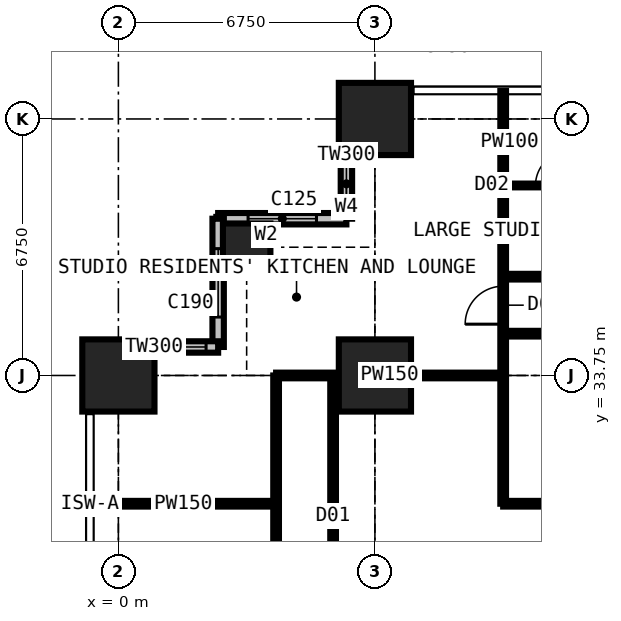
"""IFC4 building model, lengths in metres.
Left out: names, types, materials, properties, quantities, classifications, styles, units other than length and angle.
Written with IfcOpenShell. Run it as: python <this file> out.ifc"""

import sys

from ifc_helpers import new_model, si_unit, direction, frame, frame_2d, origin, origin_2d, place, context, subcontext, project, spatial, rectangle, extrude, element, fill, save


model = new_model("IFC4")
c1 = context("Model", 3, precision=1e-05, world=origin(), true_north=direction((0.0, 1.0)))
c2 = subcontext(c1, "Body", "Model", "MODEL_VIEW")
j1 = project(units=[si_unit("LENGTHUNIT", "METRE"), si_unit("PLANEANGLEUNIT", "RADIAN")], contexts=[c1])
p1 = place(None, origin())
s1 = spatial("IfcSite", under=j1, at=p1, CompositionType="ELEMENT")
p2 = place(p1, origin())
s2 = spatial("IfcBuilding", under=s1, at=p2, CompositionType="ELEMENT")
p3 = place(p2, frame((0.0, 0.0, 28.8)))
s3 = spatial("IfcBuildingStorey", under=s2, at=p3, CompositionType="ELEMENT", Elevation=28.8)
p4 = place(p3, frame((0.0, 33.75, 0.0), z_axis=(0.0, 0.0, 1.0), x_axis=(1.0, 0.0, 0.0)))
e1 = element("IfcColumn", 1, at=p4, inside=s3, PredefinedType="COLUMN", context=c2, shape_type="SweptSolid", body=[
    extrude(rectangle(XDim=1.9, YDim=1.9, at=origin_2d()), origin(), (0.0, 0.0, 1.0), 3.6),
])
p5 = place(p3, frame((3.375, 37.125, 0.0), z_axis=(0.0, 0.0, 1.0), x_axis=(1.0, 0.0, 0.0)))
e2 = element("IfcColumn", 2, at=p5, inside=s3, PredefinedType="COLUMN", context=c2, shape_type="SweptSolid", body=[
    extrude(rectangle(XDim=1.25, YDim=1.25, at=origin_2d()), origin(), (0.0, 0.0, 1.0), 3.6),
])
for number, where, z_axis, x_axis in (
    (3, (6.75, 33.75, 0.0), (0.0, 0.0, 1.0), (1.0, 0.0, 0.0)),
    (4, (6.75, 40.5, 0.0), (0.0, 0.0, 1.0), (1.0, 0.0, 0.0)),
):
    element("IfcColumn", number, at=place(p3, frame(where, z_axis=z_axis, x_axis=x_axis)), inside=s3, PredefinedType="COLUMN", context=c2, shape_type="SweptSolid", body=[
        extrude(rectangle(XDim=1.9, YDim=1.9, at=origin_2d()), origin(), (0.0, 0.0, 1.0), 3.6),
    ])
p6 = place(p3, frame((6.0, 41.25, 0.0), z_axis=(0.0, 0.0, 1.0), x_axis=(0.0, -1.0, 0.0)))
e5 = element("IfcWall", 5, at=p6, inside=s3, PredefinedType="SOLIDWALL", context=c2, shape_type="SweptSolid", body=[
    extrude(rectangle(XDim=3.375, YDim=0.3, at=frame_2d((1.688, 0.0))), origin(), (0.0, 0.0, 1.0), 3.375),
])
p7 = place(p6, frame((1.857, 0.0, 0.9)))
e6 = element("IfcOpeningElement", 6, at=p7, cuts=e5, PredefinedType="OPENING", context=c2, shape_type="SweptSolid", body=[
    extrude(rectangle(XDim=1.2, YDim=1.8, at=frame_2d((0.6, 0.9))), frame((0.0, 0.16, 0.0), z_axis=(0.0, -1.0, 0.0), x_axis=(1.0, 0.0, 0.0)), (0.0, 0.0, 1.0), 0.32),
])
p8 = place(p3, frame((6.0, 37.875, 0.0), z_axis=(0.0, 0.0, 1.0), x_axis=(-1.0, 0.0, 0.0)))
e7 = element("IfcWall", 7, at=p8, inside=s3, PredefinedType="SOLIDWALL", context=c2, shape_type="SweptSolid", body=[
    extrude(rectangle(XDim=3.375, YDim=0.3, at=frame_2d((1.688, 0.0))), origin(), (0.0, 0.0, 1.0), 3.375),
])
p9 = place(p8, frame((0.788, 0.0, 0.6)))
e8 = element("IfcOpeningElement", 8, at=p9, cuts=e7, PredefinedType="OPENING", context=c2, shape_type="SweptSolid", body=[
    extrude(rectangle(XDim=1.8, YDim=2.1, at=frame_2d((0.9, 1.05))), frame((0.0, 0.16, 0.0), z_axis=(0.0, -1.0, 0.0), x_axis=(1.0, 0.0, 0.0)), (0.0, 0.0, 1.0), 0.32),
])
p10 = place(p3, frame((2.625, 37.875, 0.0), z_axis=(0.0, 0.0, 1.0), x_axis=(0.0, -1.0, 0.0)))
e9 = element("IfcWall", 9, at=p10, inside=s3, PredefinedType="SOLIDWALL", context=c2, shape_type="SweptSolid", body=[
    extrude(rectangle(XDim=3.375, YDim=0.3, at=frame_2d((1.688, 0.0))), origin(), (0.0, 0.0, 1.0), 3.375),
])
p11 = place(p10, frame((0.788, 0.0, 0.6)))
e10 = element("IfcOpeningElement", 10, at=p11, cuts=e9, PredefinedType="OPENING", context=c2, shape_type="SweptSolid", body=[
    extrude(rectangle(XDim=1.8, YDim=2.1, at=frame_2d((0.9, 1.05))), frame((0.0, 0.16, 0.0), z_axis=(0.0, -1.0, 0.0), x_axis=(1.0, 0.0, 0.0)), (0.0, 0.0, 1.0), 0.32),
])
p12 = place(p3, frame((2.625, 34.5, 0.0), z_axis=(0.0, 0.0, 1.0), x_axis=(-1.0, 0.0, 0.0)))
e11 = element("IfcWall", 11, at=p12, inside=s3, PredefinedType="SOLIDWALL", context=c2, shape_type="SweptSolid", body=[
    extrude(rectangle(XDim=3.375, YDim=0.3, at=frame_2d((1.688, 0.0))), origin(), (0.0, 0.0, 1.0), 3.375),
])
p13 = place(p12, frame((0.317, 0.0, 0.9)))
e12 = element("IfcOpeningElement", 12, at=p13, cuts=e11, PredefinedType="OPENING", context=c2, shape_type="SweptSolid", body=[
    extrude(rectangle(XDim=1.2, YDim=1.8, at=frame_2d((0.6, 0.9))), frame((0.0, 0.16, 0.0), z_axis=(0.0, -1.0, 0.0), x_axis=(1.0, 0.0, 0.0)), (0.0, 0.0, 1.0), 0.32),
])
p14 = place(p3, frame((-0.734, 30.375, 0.0), z_axis=(0.0, 0.0, 1.0), x_axis=(1.0, 0.0, 0.0)))
e13 = element("IfcWall", 13, at=p14, inside=s3, PredefinedType="PARTITIONING", context=c2, shape_type="SweptSolid", body=[
    extrude(rectangle(XDim=4.884, YDim=0.15, at=frame_2d((2.442, 0.0))), origin(), (0.0, 0.0, 1.0), 3.375),
])
p15 = place(p3, frame((4.15, 10.125, 0.0), z_axis=(0.0, 0.0, 1.0), x_axis=(0.0, 1.0, 0.0)))
e14 = element("IfcWall", 14, at=p15, inside=s3, PredefinedType="PARTITIONING", context=c2, shape_type="SweptSolid", body=[
    extrude(rectangle(XDim=23.625, YDim=0.15, at=frame_2d((11.812, 0.0))), origin(), (0.0, 0.0, 1.0), 3.375),
])
p16 = place(p15, frame((4.2, 0.0, 0.0)))
e15 = element("IfcOpeningElement", 15, at=p16, cuts=e14, PredefinedType="OPENING", context=c2, shape_type="SweptSolid", body=[
    extrude(rectangle(XDim=0.95, YDim=2.2, at=frame_2d((0.475, 1.1))), frame((0.0, 0.085, 0.0), z_axis=(0.0, -1.0, 0.0), x_axis=(1.0, 0.0, 0.0)), (0.0, 0.0, 1.0), 0.17),
])
p17 = place(p15, frame((10.95, 0.0, 0.0)))
e16 = element("IfcOpeningElement", 16, at=p17, cuts=e14, PredefinedType="OPENING", context=c2, shape_type="SweptSolid", body=[
    extrude(rectangle(XDim=0.95, YDim=2.2, at=frame_2d((0.475, 1.1))), frame((0.0, 0.085, 0.0), z_axis=(0.0, -1.0, 0.0), x_axis=(1.0, 0.0, 0.0)), (0.0, 0.0, 1.0), 0.17),
])
p18 = place(p15, frame((17.7, 0.0, 0.0)))
e17 = element("IfcOpeningElement", 17, at=p18, cuts=e14, PredefinedType="OPENING", context=c2, shape_type="SweptSolid", body=[
    extrude(rectangle(XDim=0.95, YDim=2.2, at=frame_2d((0.475, 1.1))), frame((0.0, 0.085, 0.0), z_axis=(0.0, -1.0, 0.0), x_axis=(1.0, 0.0, 0.0)), (0.0, 0.0, 1.0), 0.17),
])
p19 = place(p3, frame((4.15, 33.75, 0.0), z_axis=(0.0, 0.0, 1.0), x_axis=(1.0, 0.0, 0.0)))
e18 = element("IfcWall", 18, at=p19, inside=s3, PredefinedType="PARTITIONING", context=c2, shape_type="SweptSolid", body=[
    extrude(rectangle(XDim=5.975, YDim=0.15, at=frame_2d((2.988, 0.0))), origin(), (0.0, 0.0, 1.0), 2.877),
])
p20 = place(p3, frame((5.65, 22.988, 0.0), z_axis=(0.0, 0.0, 1.0), x_axis=(0.0, 1.0, 0.0)))
e19 = element("IfcWall", 19, at=p20, inside=s3, PredefinedType="PARTITIONING", context=c2, shape_type="SweptSolid", body=[
    extrude(rectangle(XDim=10.762, YDim=0.15, at=frame_2d((5.381, 0.0))), origin(), (0.0, 0.0, 1.0), 3.375),
])
p21 = place(p20, frame((5.0, 0.0, 0.0)))
e20 = element("IfcOpeningElement", 20, at=p21, cuts=e19, PredefinedType="OPENING", context=c2, shape_type="SweptSolid", body=[
    extrude(rectangle(XDim=0.95, YDim=2.2, at=frame_2d((0.475, 1.1))), frame((0.0, 0.085, 0.0), z_axis=(0.0, -1.0, 0.0), x_axis=(1.0, 0.0, 0.0)), (0.0, 0.0, 1.0), 0.17),
])
p22 = place(p3, frame((10.125, 30.375, 0.0), z_axis=(0.0, 0.0, 1.0), x_axis=(0.0, 1.0, 0.0)))
e21 = element("IfcWall", 21, at=p22, inside=s3, PredefinedType="PARTITIONING", context=c2, shape_type="SweptSolid", body=[
    extrude(rectangle(XDim=10.859, YDim=0.15, at=frame_2d((5.429, 0.0))), origin(), (0.0, 0.0, 1.0), 3.375),
])
p23 = place(p22, frame((4.725, 0.0, 0.0)))
e22 = element("IfcOpeningElement", 22, at=p23, cuts=e21, PredefinedType="OPENING", context=c2, shape_type="SweptSolid", body=[
    extrude(rectangle(XDim=1.0, YDim=2.2, at=frame_2d((0.5, 1.1))), frame((0.0, 0.085, 0.0), z_axis=(0.0, -1.0, 0.0), x_axis=(1.0, 0.0, 0.0)), (0.0, 0.0, 1.0), 0.17),
])
p24 = place(p3, frame((10.125, 30.375, 0.0), z_axis=(0.0, 0.0, 1.0), x_axis=(1.0, 0.0, 0.0)))
e23 = element("IfcWall", 23, at=p24, inside=s3, PredefinedType="PARTITIONING", context=c2, shape_type="SweptSolid", body=[
    extrude(rectangle(XDim=1.175, YDim=0.15, at=frame_2d((0.587, 0.0))), origin(), (0.0, 0.0, 1.0), 3.375),
])
p25 = place(p3, frame((10.125, 34.85, 0.0), z_axis=(0.0, 0.0, 1.0), x_axis=(1.0, 0.0, 0.0)))
e24 = element("IfcWall", 24, at=p25, inside=s3, PredefinedType="PARTITIONING", context=c2, shape_type="SweptSolid", body=[
    extrude(rectangle(XDim=10.762, YDim=0.15, at=frame_2d((5.381, 0.0))), origin(), (0.0, 0.0, 1.0), 3.375),
])
p26 = place(p25, frame((4.9, 0.0, 0.0)))
e25 = element("IfcOpeningElement", 25, at=p26, cuts=e24, PredefinedType="OPENING", context=c2, shape_type="SweptSolid", body=[
    extrude(rectangle(XDim=0.95, YDim=2.2, at=frame_2d((0.475, 1.1))), frame((0.0, 0.085, 0.0), z_axis=(0.0, -1.0, 0.0), x_axis=(1.0, 0.0, 0.0)), (0.0, 0.0, 1.0), 0.17),
])
p27 = place(p3, frame((10.125, 36.35, 0.0), z_axis=(0.0, 0.0, 1.0), x_axis=(1.0, 0.0, 0.0)))
e26 = element("IfcWall", 26, at=p27, inside=s3, PredefinedType="PARTITIONING", context=c2, shape_type="SweptSolid", body=[
    extrude(rectangle(XDim=23.625, YDim=0.15, at=frame_2d((11.812, 0.0))), origin(), (0.0, 0.0, 1.0), 3.375),
])
p28 = place(p27, frame((20.5, 0.0, 0.0)))
e27 = element("IfcOpeningElement", 27, at=p28, cuts=e26, PredefinedType="OPENING", context=c2, shape_type="SweptSolid", body=[
    extrude(rectangle(XDim=0.95, YDim=2.2, at=frame_2d((0.475, 1.1))), frame((0.0, 0.085, 0.0), z_axis=(0.0, -1.0, 0.0), x_axis=(1.0, 0.0, 0.0)), (0.0, 0.0, 1.0), 0.17),
])
p29 = place(p27, frame((17.125, 0.0, 0.0)))
e28 = element("IfcOpeningElement", 28, at=p29, cuts=e26, PredefinedType="OPENING", context=c2, shape_type="SweptSolid", body=[
    extrude(rectangle(XDim=0.95, YDim=2.2, at=frame_2d((0.475, 1.1))), frame((0.0, 0.085, 0.0), z_axis=(0.0, -1.0, 0.0), x_axis=(1.0, 0.0, 0.0)), (0.0, 0.0, 1.0), 0.17),
])
p30 = place(p27, frame((13.7, 0.0, 0.0)))
e29 = element("IfcOpeningElement", 29, at=p30, cuts=e26, PredefinedType="OPENING", context=c2, shape_type="SweptSolid", body=[
    extrude(rectangle(XDim=0.95, YDim=2.2, at=frame_2d((0.475, 1.1))), frame((0.0, 0.085, 0.0), z_axis=(0.0, -1.0, 0.0), x_axis=(1.0, 0.0, 0.0)), (0.0, 0.0, 1.0), 0.17),
])
p31 = place(p27, frame((4.2, 0.0, 0.0)))
e30 = element("IfcOpeningElement", 30, at=p31, cuts=e26, PredefinedType="OPENING", context=c2, shape_type="SweptSolid", body=[
    extrude(rectangle(XDim=0.95, YDim=2.2, at=frame_2d((0.475, 1.1))), frame((0.0, 0.085, 0.0), z_axis=(0.0, -1.0, 0.0), x_axis=(1.0, 0.0, 0.0)), (0.0, 0.0, 1.0), 0.17),
])
p32 = place(p27, frame((10.95, 0.0, 0.0)))
e31 = element("IfcOpeningElement", 31, at=p32, cuts=e26, PredefinedType="OPENING", context=c2, shape_type="SweptSolid", body=[
    extrude(rectangle(XDim=0.95, YDim=2.2, at=frame_2d((0.475, 1.1))), frame((0.0, 0.085, 0.0), z_axis=(0.0, -1.0, 0.0), x_axis=(1.0, 0.0, 0.0)), (0.0, 0.0, 1.0), 0.17),
])
p33 = place(p3, frame((10.125, 38.75, 0.0), z_axis=(0.0, 0.0, 1.0), x_axis=(1.0, 0.0, 0.0)))
e32 = element("IfcWall", 32, at=p33, inside=s3, PredefinedType="PARTITIONING", context=c2, shape_type="SweptSolid", body=[
    extrude(rectangle(XDim=2.6, YDim=0.1, at=frame_2d((1.3, 0.0))), origin(), (0.0, 0.0, 1.0), 3.375),
])
p34 = place(p33, frame((0.85, 0.0, 0.0)))
e33 = element("IfcOpeningElement", 33, at=p34, cuts=e32, PredefinedType="OPENING", context=c2, shape_type="SweptSolid", body=[
    extrude(rectangle(XDim=0.9, YDim=2.2, at=frame_2d((0.45, 1.1))), frame((0.0, 0.06, 0.0), z_axis=(0.0, -1.0, 0.0), x_axis=(1.0, 0.0, 0.0)), (0.0, 0.0, 1.0), 0.12),
])
p35 = place(p7, origin())
e34 = element("IfcWindow", 34, at=p35, inside=s3, PartitioningType="SINGLE_PANEL", PredefinedType="WINDOW", context=c2, shape_type="SweptSolid", body=[
    extrude(rectangle(XDim=1.2, YDim=1.8, at=frame_2d((0.6, 0.9))), frame((0.0, 0.03, 0.0), z_axis=(0.0, -1.0, 0.0), x_axis=(1.0, 0.0, 0.0)), (0.0, 0.0, 1.0), 0.06),
])
fill(e6, e34)
p36 = place(p9, origin())
e35 = element("IfcWindow", 35, at=p36, inside=s3, PartitioningType="SINGLE_PANEL", PredefinedType="WINDOW", context=c2, shape_type="SweptSolid", body=[
    extrude(rectangle(XDim=1.8, YDim=2.1, at=frame_2d((0.9, 1.05))), frame((0.0, 0.03, 0.0), z_axis=(0.0, -1.0, 0.0), x_axis=(1.0, 0.0, 0.0)), (0.0, 0.0, 1.0), 0.06),
])
fill(e8, e35)
p37 = place(p11, origin())
e36 = element("IfcWindow", 36, at=p37, inside=s3, PartitioningType="SINGLE_PANEL", PredefinedType="WINDOW", context=c2, shape_type="SweptSolid", body=[
    extrude(rectangle(XDim=1.8, YDim=2.1, at=frame_2d((0.9, 1.05))), frame((0.0, 0.03, 0.0), z_axis=(0.0, -1.0, 0.0), x_axis=(1.0, 0.0, 0.0)), (0.0, 0.0, 1.0), 0.06),
])
fill(e10, e36)
p38 = place(p13, origin())
e37 = element("IfcWindow", 37, at=p38, inside=s3, PartitioningType="SINGLE_PANEL", PredefinedType="WINDOW", context=c2, shape_type="SweptSolid", body=[
    extrude(rectangle(XDim=1.2, YDim=1.8, at=frame_2d((0.6, 0.9))), frame((0.0, 0.03, 0.0), z_axis=(0.0, -1.0, 0.0), x_axis=(1.0, 0.0, 0.0)), (0.0, 0.0, 1.0), 0.06),
])
fill(e12, e37)
p39 = place(p34, origin())
e38 = element("IfcDoor", 38, at=p39, inside=s3, OperationType="SINGLE_SWING_RIGHT", PredefinedType="DOOR", context=c2, shape_type="SweptSolid", body=[
    extrude(rectangle(XDim=0.9, YDim=2.2, at=frame_2d((0.45, 1.1))), frame((0.0, 0.025, 0.0), z_axis=(0.0, -1.0, 0.0), x_axis=(1.0, 0.0, 0.0)), (0.0, 0.0, 1.0), 0.05),
])
fill(e33, e38)
p40 = place(p23, origin())
e39 = element("IfcDoor", 39, at=p40, inside=s3, OperationType="SINGLE_SWING_LEFT", PredefinedType="DOOR", context=c2, shape_type="SweptSolid", body=[
    extrude(rectangle(XDim=1.0, YDim=2.2, at=frame_2d((0.5, 1.1))), frame((0.0, 0.025, 0.0), z_axis=(0.0, -1.0, 0.0), x_axis=(1.0, 0.0, 0.0)), (0.0, 0.0, 1.0), 0.05),
])
fill(e22, e39)
save(model, sys.argv[1])
